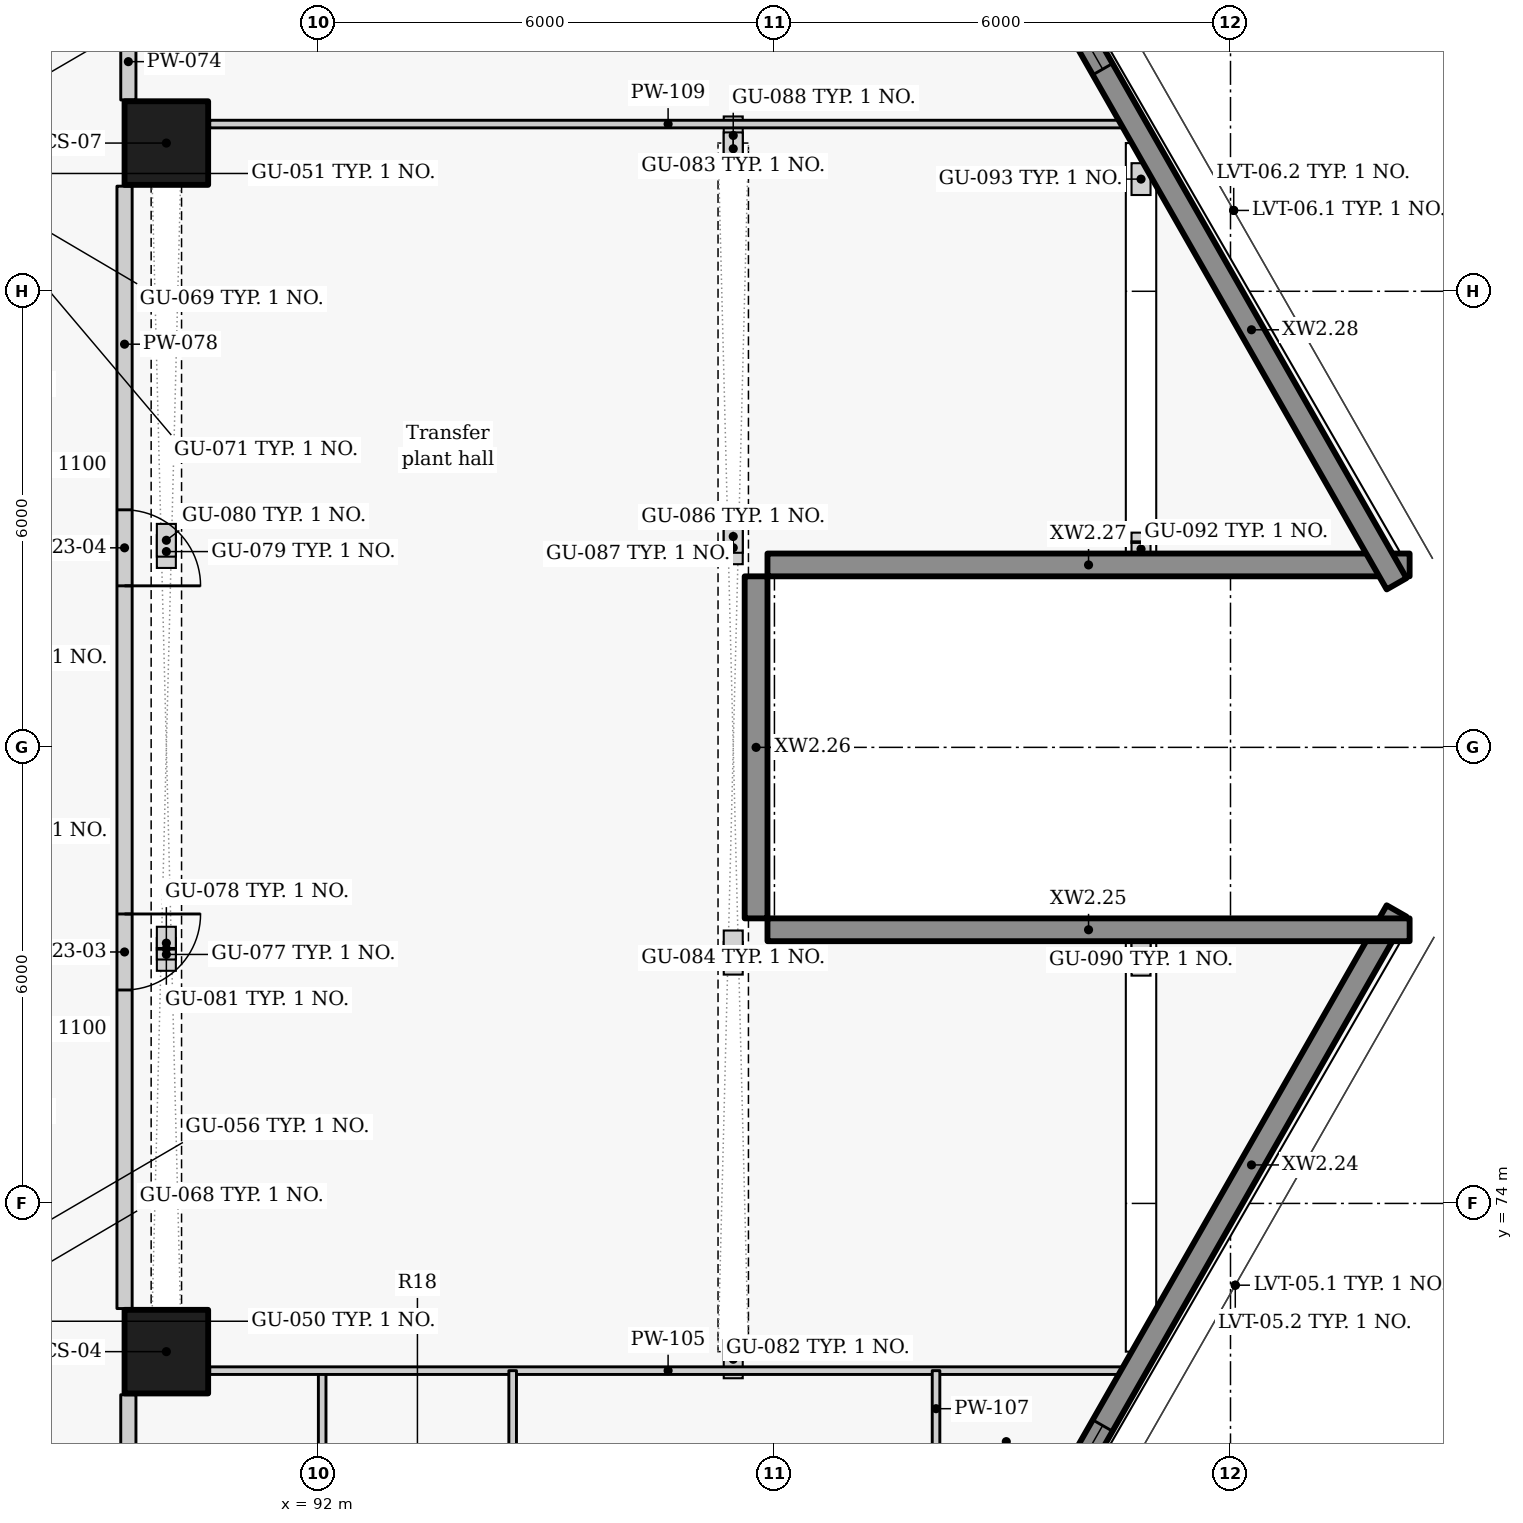
"""IFC4 building model, lengths in metres.
Left out: names, types, materials, properties, quantities, classifications, styles, units other than length and angle.
Written with IfcOpenShell. Run it as: python <this file> out.ifc"""

import sys

from ifc_helpers import new_model, si_unit, direction, frame, frame_2d, origin, origin_2d, place, context, subcontext, project, spatial, rectangle, extrude, element, fill, save


model = new_model("IFC4")
c1 = context("Model", 3, precision=1e-05, world=origin(), true_north=direction((0.0, 1.0)))
c2 = subcontext(c1, "Body", "Model", "MODEL_VIEW")
j1 = project(units=[si_unit("LENGTHUNIT", "METRE"), si_unit("PLANEANGLEUNIT", "RADIAN")], contexts=[c1])
p1 = place(None, origin())
s1 = spatial("IfcSite", under=j1, at=p1, CompositionType="ELEMENT")
p2 = place(p1, origin())
s2 = spatial("IfcBuilding", under=s1, at=p2, CompositionType="ELEMENT")
p3 = place(p2, frame((0.0, 0.0, 38.1)))
s3 = spatial("IfcBuildingStorey", under=s2, at=p3, CompositionType="ELEMENT", Elevation=38.1)
for number, where, z_axis, x_axis in (
    (1, (90.0, 72.05, 0.0), (0.0, 0.0, 1.0), (0.0, 1.0, 0.0)),
    (2, (90.0, 87.95, 0.0), (0.0, 0.0, 1.0), (0.0, 1.0, 0.0)),
):
    element("IfcColumn", number, at=place(p3, frame(where, z_axis=z_axis, x_axis=x_axis)), inside=s3, PredefinedType="COLUMN", context=c2, shape_type="SweptSolid", body=[
        extrude(rectangle(XDim=1.1, YDim=1.1, at=origin_2d()), origin(), (0.0, 0.0, 1.0), 3.3),
    ])
p4 = place(p3, frame((100.9, 68.595, 0.0), z_axis=(0.0, 0.0, 1.0), x_axis=(0.49599088679, 0.868327726277, 0.0)))
e3 = element("IfcWall", 3, at=p4, inside=s3, PredefinedType="SOLIDWALL", context=c2, shape_type="SweptSolid", body=[
    extrude(rectangle(XDim=10.656, YDim=0.3, at=frame_2d((5.328, 0.0))), origin(), (0.0, 0.0, 1.0), 2.425),
])
p5 = place(p4, frame((0.759, 0.0, 0.9)))
e4 = element("IfcOpeningElement", 4, at=p5, cuts=e3, PredefinedType="OPENING", context=c2, shape_type="SweptSolid", body=[
    extrude(rectangle(XDim=2.1, YDim=1.1, at=frame_2d((1.05, 0.55))), frame((0.0, 0.16, 0.0), z_axis=(0.0, -1.0, 0.0), x_axis=(1.0, 0.0, 0.0)), (0.0, 0.0, 1.0), 0.32),
])
p6 = place(p3, frame((106.357, 77.6, 0.0), z_axis=(0.0, 0.0, 1.0), x_axis=(-1.0, 0.0, 0.0)))
e5 = element("IfcWall", 5, at=p6, inside=s3, PredefinedType="SOLIDWALL", context=c2, shape_type="SweptSolid", body=[
    extrude(rectangle(XDim=8.448, YDim=0.3, at=frame_2d((4.224, 0.0))), origin(), (0.0, 0.0, 1.0), 2.425),
])
p7 = place(p3, frame((97.758, 77.75, 0.0), z_axis=(0.0, 0.0, 1.0), x_axis=(0.0, 1.0, 0.0)))
e6 = element("IfcWall", 6, at=p7, inside=s3, PredefinedType="SOLIDWALL", context=c2, shape_type="SweptSolid", body=[
    extrude(rectangle(XDim=4.5, YDim=0.3, at=frame_2d((2.25, 0.0))), origin(), (0.0, 0.0, 1.0), 2.425),
])
p8 = place(p3, frame((97.908, 82.4, 0.0), z_axis=(0.0, 0.0, 1.0), x_axis=(1.0, 0.0, 0.0)))
e7 = element("IfcWall", 7, at=p8, inside=s3, PredefinedType="SOLIDWALL", context=c2, shape_type="SweptSolid", body=[
    extrude(rectangle(XDim=8.448, YDim=0.3, at=frame_2d((4.224, 0.0))), origin(), (0.0, 0.0, 1.0), 2.425),
])
p9 = place(p3, frame((106.185, 82.152, 0.0), z_axis=(0.0, 0.0, 1.0), x_axis=(-0.49599088679, 0.868327726277, 0.0)))
e8 = element("IfcWall", 8, at=p9, inside=s3, PredefinedType="SOLIDWALL", context=c2, shape_type="SweptSolid", body=[
    extrude(rectangle(XDim=10.656, YDim=0.3, at=frame_2d((5.328, 0.0))), origin(), (0.0, 0.0, 1.0), 2.425),
])
p10 = place(p9, frame((7.797, 0.0, 0.9)))
e9 = element("IfcOpeningElement", 9, at=p10, cuts=e8, PredefinedType="OPENING", context=c2, shape_type="SweptSolid", body=[
    extrude(rectangle(XDim=2.1, YDim=1.1, at=frame_2d((1.05, 0.55))), frame((0.0, 0.16, 0.0), z_axis=(0.0, -1.0, 0.0), x_axis=(1.0, 0.0, 0.0)), (0.0, 0.0, 1.0), 0.32),
])
p11 = place(p3, frame((89.5, 71.483, 0.0), z_axis=(0.0, 0.0, 1.0), x_axis=(0.0, -1.0, 0.0)))
e10 = element("IfcWall", 10, at=p11, inside=s3, PredefinedType="PARTITIONING", context=c2, shape_type="SweptSolid", body=[
    extrude(rectangle(XDim=3.216, YDim=0.2, at=frame_2d((1.608, 0.0))), origin(), (0.0, 0.0, 1.0), 3.025),
])
p12 = place(p11, frame((1.108, 0.0, 0.0)))
e11 = element("IfcOpeningElement", 11, at=p12, cuts=e10, PredefinedType="OPENING", context=c2, shape_type="SweptSolid", body=[
    extrude(rectangle(XDim=1.0, YDim=2.1, at=frame_2d((0.5, 1.05))), frame((0.0, 0.11, 0.0), z_axis=(0.0, -1.0, 0.0), x_axis=(1.0, 0.0, 0.0)), (0.0, 0.0, 1.0), 0.22),
])
p13 = place(p3, frame((89.5, 91.733, 0.0), z_axis=(0.0, 0.0, 1.0), x_axis=(0.0, -1.0, 0.0)))
e12 = element("IfcWall", 12, at=p13, inside=s3, PredefinedType="PARTITIONING", context=c2, shape_type="SweptSolid", body=[
    extrude(rectangle(XDim=3.216, YDim=0.2, at=frame_2d((1.608, 0.0))), origin(), (0.0, 0.0, 1.0), 3.025),
])
p14 = place(p13, frame((1.108, 0.0, 0.0)))
e13 = element("IfcOpeningElement", 13, at=p14, cuts=e12, PredefinedType="OPENING", context=c2, shape_type="SweptSolid", body=[
    extrude(rectangle(XDim=1.0, YDim=2.1, at=frame_2d((0.5, 1.05))), frame((0.0, 0.11, 0.0), z_axis=(0.0, -1.0, 0.0), x_axis=(1.0, 0.0, 0.0)), (0.0, 0.0, 1.0), 0.22),
])
p15 = place(p3, frame((89.45, 87.383, 0.0), z_axis=(0.0, 0.0, 1.0), x_axis=(0.0, -1.0, 0.0)))
e14 = element("IfcWall", 14, at=p15, inside=s3, PredefinedType="PARTITIONING", context=c2, shape_type="SweptSolid", body=[
    extrude(rectangle(XDim=14.766, YDim=0.2, at=frame_2d((7.383, 0.0))), origin(), (0.0, 0.0, 1.0), 3.025),
])
p16 = place(p15, frame((9.575, 0.0, 0.0)))
e15 = element("IfcOpeningElement", 15, at=p16, cuts=e14, PredefinedType="OPENING", context=c2, shape_type="SweptSolid", body=[
    extrude(rectangle(XDim=1.0, YDim=2.1, at=frame_2d((0.5, 1.05))), frame((0.0, 0.11, 0.0), z_axis=(0.0, -1.0, 0.0), x_axis=(1.0, 0.0, 0.0)), (0.0, 0.0, 1.0), 0.22),
])
p17 = place(p15, frame((4.258, 0.0, 0.0)))
e16 = element("IfcOpeningElement", 16, at=p17, cuts=e14, PredefinedType="OPENING", context=c2, shape_type="SweptSolid", body=[
    extrude(rectangle(XDim=1.0, YDim=2.1, at=frame_2d((0.5, 1.05))), frame((0.0, 0.11, 0.0), z_axis=(0.0, -1.0, 0.0), x_axis=(1.0, 0.0, 0.0)), (0.0, 0.0, 1.0), 0.22),
])
p18 = place(p3, frame((92.05, 71.8, 0.0), z_axis=(0.0, 0.0, 1.0), x_axis=(0.0, -1.0, 0.0)))
e17 = element("IfcWall", 17, at=p18, inside=s3, PredefinedType="PARTITIONING", context=c2, shape_type="SweptSolid", body=[
    extrude(rectangle(XDim=5.7, YDim=0.1, at=frame_2d((2.85, 0.0))), origin(), (0.0, 0.0, 1.0), 3.025),
])
p19 = place(p18, frame((2.425, 0.0, 0.0)))
e18 = element("IfcOpeningElement", 18, at=p19, cuts=e17, PredefinedType="OPENING", context=c2, shape_type="SweptSolid", body=[
    extrude(rectangle(XDim=0.85, YDim=2.1, at=frame_2d((0.425, 1.05))), frame((0.0, 0.06, 0.0), z_axis=(0.0, -1.0, 0.0), x_axis=(1.0, 0.0, 0.0)), (0.0, 0.0, 1.0), 0.12),
])
p20 = place(p3, frame((90.57, 71.8, 0.0), z_axis=(0.0, 0.0, 1.0), x_axis=(1.0, 0.0, 0.0)))
e19 = element("IfcWall", 19, at=p20, inside=s3, PredefinedType="PARTITIONING", context=c2, shape_type="SweptSolid", body=[
    extrude(rectangle(XDim=12.062, YDim=0.1, at=frame_2d((6.031, 0.0))), origin(), (0.0, 0.0, 1.0), 2.405),
])
p21 = place(p3, frame((94.556, 71.8, 0.0), z_axis=(0.0, 0.0, 1.0), x_axis=(0.0, -1.0, 0.0)))
e20 = element("IfcWall", 20, at=p21, inside=s3, PredefinedType="PARTITIONING", context=c2, shape_type="SweptSolid", body=[
    extrude(rectangle(XDim=5.7, YDim=0.1, at=frame_2d((2.85, 0.0))), origin(), (0.0, 0.0, 1.0), 3.025),
])
p22 = place(p21, frame((2.4, 0.0, 0.0)))
e21 = element("IfcOpeningElement", 21, at=p22, cuts=e20, PredefinedType="OPENING", context=c2, shape_type="SweptSolid", body=[
    extrude(rectangle(XDim=0.9, YDim=2.1, at=frame_2d((0.45, 1.05))), frame((0.0, 0.06, 0.0), z_axis=(0.0, -1.0, 0.0), x_axis=(1.0, 0.0, 0.0)), (0.0, 0.0, 1.0), 0.12),
])
p23 = place(p3, frame((100.126, 71.8, 0.0), z_axis=(0.0, 0.0, 1.0), x_axis=(0.0, -1.0, 0.0)))
e22 = element("IfcWall", 22, at=p23, inside=s3, PredefinedType="PARTITIONING", context=c2, shape_type="SweptSolid", body=[
    extrude(rectangle(XDim=3.101, YDim=0.1, at=frame_2d((1.551, 0.0))), origin(), (0.0, 0.0, 1.0), 3.025),
])
p24 = place(p23, frame((1.101, 0.0, 0.0)))
e23 = element("IfcOpeningElement", 23, at=p24, cuts=e22, PredefinedType="OPENING", context=c2, shape_type="SweptSolid", body=[
    extrude(rectangle(XDim=0.9, YDim=2.1, at=frame_2d((0.45, 1.05))), frame((0.0, 0.06, 0.0), z_axis=(0.0, -1.0, 0.0), x_axis=(1.0, 0.0, 0.0)), (0.0, 0.0, 1.0), 0.12),
])
p25 = place(p3, frame((90.57, 88.2, 0.0), z_axis=(0.0, 0.0, 1.0), x_axis=(1.0, 0.0, 0.0)))
e24 = element("IfcWall", 24, at=p25, inside=s3, PredefinedType="PARTITIONING", context=c2, shape_type="SweptSolid", body=[
    extrude(rectangle(XDim=12.062, YDim=0.1, at=frame_2d((6.031, 0.0))), origin(), (0.0, 0.0, 1.0), 2.405),
])
p26 = place(p5, origin())
e25 = element("IfcWindow", 25, at=p26, inside=s3, PartitioningType="SINGLE_PANEL", PredefinedType="WINDOW", context=c2, shape_type="SweptSolid", body=[
    extrude(rectangle(XDim=2.1, YDim=1.1, at=frame_2d((1.05, 0.55))), frame((0.0, 0.03, 0.0), z_axis=(0.0, -1.0, 0.0), x_axis=(1.0, 0.0, 0.0)), (0.0, 0.0, 1.0), 0.06),
])
fill(e4, e25)
p27 = place(p10, origin())
e26 = element("IfcWindow", 26, at=p27, inside=s3, PartitioningType="SINGLE_PANEL", PredefinedType="WINDOW", context=c2, shape_type="SweptSolid", body=[
    extrude(rectangle(XDim=2.1, YDim=1.1, at=frame_2d((1.05, 0.55))), frame((0.0, 0.03, 0.0), z_axis=(0.0, -1.0, 0.0), x_axis=(1.0, 0.0, 0.0)), (0.0, 0.0, 1.0), 0.06),
])
fill(e9, e26)
p28 = place(p16, origin())
e27 = element("IfcDoor", 27, at=p28, inside=s3, OperationType="SINGLE_SWING_LEFT", PredefinedType="DOOR", context=c2, shape_type="SweptSolid", body=[
    extrude(rectangle(XDim=1.0, YDim=2.1, at=frame_2d((0.5, 1.05))), frame((0.0, 0.025, 0.0), z_axis=(0.0, -1.0, 0.0), x_axis=(1.0, 0.0, 0.0)), (0.0, 0.0, 1.0), 0.05),
])
fill(e15, e27)
p29 = place(p17, origin())
e28 = element("IfcDoor", 28, at=p29, inside=s3, OperationType="SINGLE_SWING_RIGHT", PredefinedType="DOOR", context=c2, shape_type="SweptSolid", body=[
    extrude(rectangle(XDim=1.0, YDim=2.1, at=frame_2d((0.5, 1.05))), frame((0.0, 0.025, 0.0), z_axis=(0.0, -1.0, 0.0), x_axis=(1.0, 0.0, 0.0)), (0.0, 0.0, 1.0), 0.05),
])
fill(e16, e28)
save(model, sys.argv[1])
